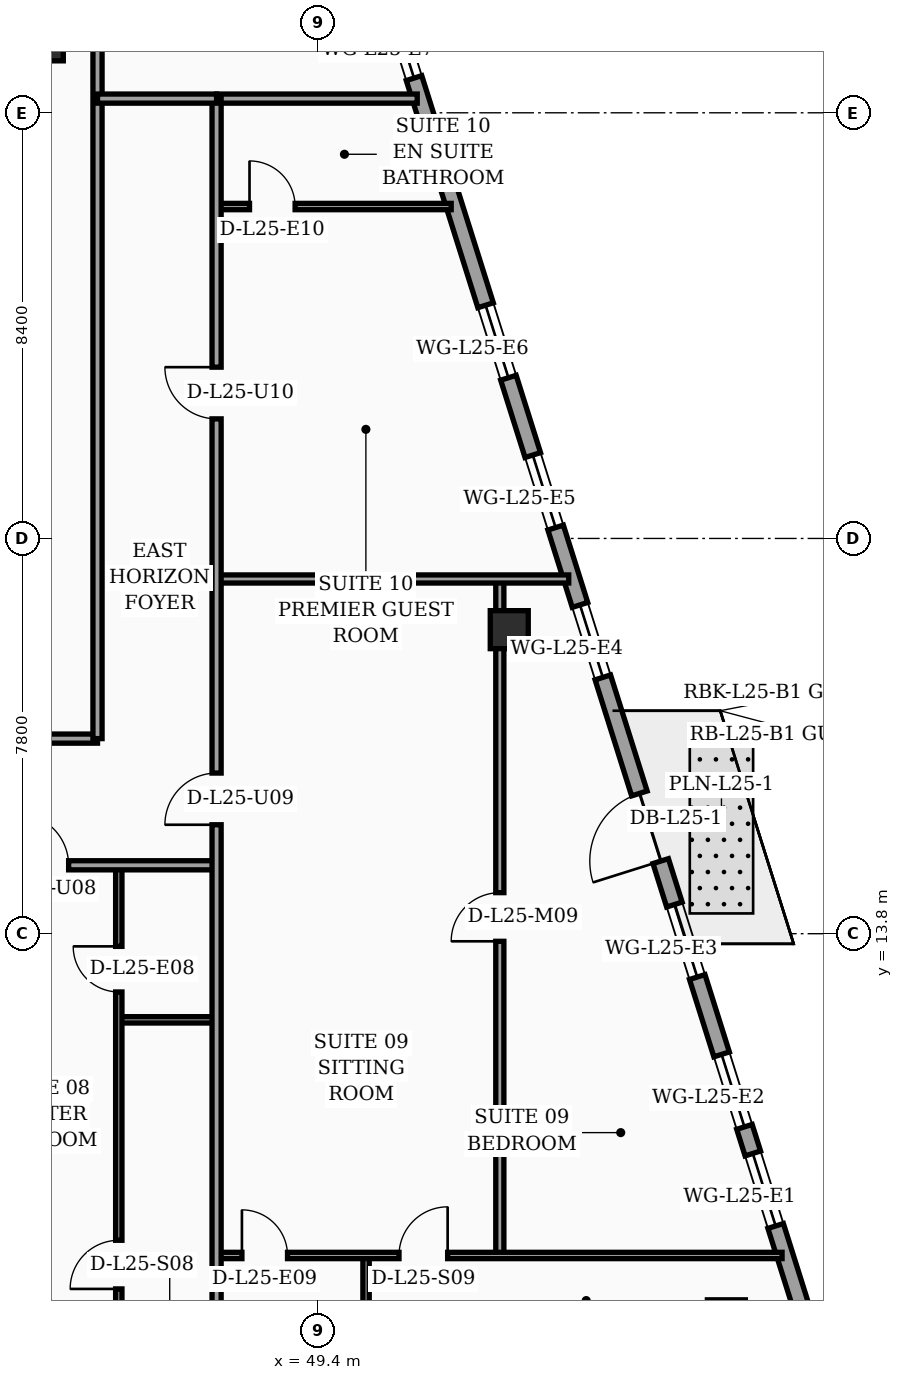
"""IFC4 building model, lengths in metres.
Left out: names, types, materials, properties, quantities, classifications, styles, units other than length and angle.
Written with IfcOpenShell. Run it as: python <this file> out.ifc"""

import sys

from ifc_helpers import new_model, si_unit, direction, frame, frame_2d, origin, origin_2d, place, context, subcontext, project, spatial, rectangle, hollow_rectangle, extrude, element, fill, save


model = new_model("IFC4")
c1 = context("Model", 3, precision=1e-05, world=origin(), true_north=direction((0.0, 1.0)))
c2 = subcontext(c1, "Body", "Model", "MODEL_VIEW")
j1 = project(units=[si_unit("LENGTHUNIT", "METRE"), si_unit("PLANEANGLEUNIT", "RADIAN")], contexts=[c1])
p1 = place(None, origin())
s1 = spatial("IfcSite", under=j1, at=p1, CompositionType="ELEMENT")
p2 = place(p1, origin())
s2 = spatial("IfcBuilding", under=s1, at=p2, CompositionType="ELEMENT")
p3 = place(p2, frame((0.0, 0.0, 105.0)))
s3 = spatial("IfcBuildingStorey", under=s2, at=p3, CompositionType="ELEMENT", Elevation=105.0)
for number, where, z_axis, x_axis in (
    (1, (44.0, 31.4, 0.0), (0.0, 0.0, 1.0), (1.0, 0.0, 0.0)),
    (2, (57.461, 6.2, 0.0), (0.0, 0.0, 1.0), (1.0, 0.0, 0.0)),
    (3, (53.176, 19.8, 0.0), (0.0, 0.0, 1.0), (1.0, 0.0, 0.0)),
):
    element("IfcColumn", number, at=place(p3, frame(where, z_axis=z_axis, x_axis=x_axis)), inside=s3, PredefinedType="COLUMN", context=c2, shape_type="SweptSolid", body=[
        extrude(hollow_rectangle(XDim=0.75, YDim=0.75, WallThickness=0.032, at=origin_2d()), origin(), (0.0, 0.0, 1.0), 3.56),
    ])
p4 = place(p3, frame((59.23, 5.505, 0.0), z_axis=(0.0, 0.0, 1.0), x_axis=(-0.300509063924, 0.953778958931, 0.0)))
e4 = element("IfcWall", 4, at=p4, inside=s3, PredefinedType="SOLIDWALL", context=c2, shape_type="SweptSolid", body=[
    extrude(rectangle(XDim=30.814, YDim=0.32, at=frame_2d((15.407, 0.0))), origin(), (0.0, 0.0, 1.0), 3.56),
])
p5 = place(p4, frame((10.199, 0.0, 0.0)))
e5 = element("IfcOpeningElement", 5, at=p5, cuts=e4, PredefinedType="OPENING", context=c2, shape_type="SweptSolid", body=[
    extrude(rectangle(XDim=1.4, YDim=2.25, at=frame_2d((0.7, 1.125))), frame((0.0, 0.17, 0.0), z_axis=(0.0, -1.0, 0.0), x_axis=(1.0, 0.0, 0.0)), (0.0, 0.0, 1.0), 0.34),
])
p6 = place(p4, frame((2.65, 0.0, 0.75)))
e6 = element("IfcOpeningElement", 6, at=p6, cuts=e4, PredefinedType="OPENING", context=c2, shape_type="SweptSolid", body=[
    extrude(rectangle(XDim=1.5, YDim=1.6, at=frame_2d((0.75, 0.8))), frame((0.0, 0.17, 0.0), z_axis=(0.0, -1.0, 0.0), x_axis=(1.0, 0.0, 0.0)), (0.0, 0.0, 1.0), 0.34),
])
p7 = place(p4, frame((4.7, 0.0, 0.75)))
e7 = element("IfcOpeningElement", 7, at=p7, cuts=e4, PredefinedType="OPENING", context=c2, shape_type="SweptSolid", body=[
    extrude(rectangle(XDim=1.5, YDim=1.6, at=frame_2d((0.75, 0.8))), frame((0.0, 0.17, 0.0), z_axis=(0.0, -1.0, 0.0), x_axis=(1.0, 0.0, 0.0)), (0.0, 0.0, 1.0), 0.34),
])
p8 = place(p4, frame((7.8, 0.0, 0.75)))
e8 = element("IfcOpeningElement", 8, at=p8, cuts=e4, PredefinedType="OPENING", context=c2, shape_type="SweptSolid", body=[
    extrude(rectangle(XDim=1.5, YDim=1.6, at=frame_2d((0.75, 0.8))), frame((0.0, 0.17, 0.0), z_axis=(0.0, -1.0, 0.0), x_axis=(1.0, 0.0, 0.0)), (0.0, 0.0, 1.0), 0.34),
])
p9 = place(p4, frame((14.0, 0.0, 0.75)))
e9 = element("IfcOpeningElement", 9, at=p9, cuts=e4, PredefinedType="OPENING", context=c2, shape_type="SweptSolid", body=[
    extrude(rectangle(XDim=1.5, YDim=1.6, at=frame_2d((0.75, 0.8))), frame((0.0, 0.17, 0.0), z_axis=(0.0, -1.0, 0.0), x_axis=(1.0, 0.0, 0.0)), (0.0, 0.0, 1.0), 0.34),
])
p10 = place(p4, frame((17.1, 0.0, 0.75)))
e10 = element("IfcOpeningElement", 10, at=p10, cuts=e4, PredefinedType="OPENING", context=c2, shape_type="SweptSolid", body=[
    extrude(rectangle(XDim=1.5, YDim=1.6, at=frame_2d((0.75, 0.8))), frame((0.0, 0.17, 0.0), z_axis=(0.0, -1.0, 0.0), x_axis=(1.0, 0.0, 0.0)), (0.0, 0.0, 1.0), 0.34),
])
p11 = place(p4, frame((20.2, 0.0, 0.75)))
e11 = element("IfcOpeningElement", 11, at=p11, cuts=e4, PredefinedType="OPENING", context=c2, shape_type="SweptSolid", body=[
    extrude(rectangle(XDim=1.5, YDim=1.6, at=frame_2d((0.75, 0.8))), frame((0.0, 0.17, 0.0), z_axis=(0.0, -1.0, 0.0), x_axis=(1.0, 0.0, 0.0)), (0.0, 0.0, 1.0), 0.34),
])
p12 = place(p4, frame((26.4, 0.0, 0.75)))
e12 = element("IfcOpeningElement", 12, at=p12, cuts=e4, PredefinedType="OPENING", context=c2, shape_type="SweptSolid", body=[
    extrude(rectangle(XDim=1.5, YDim=1.6, at=frame_2d((0.75, 0.8))), frame((0.0, 0.17, 0.0), z_axis=(0.0, -1.0, 0.0), x_axis=(1.0, 0.0, 0.0)), (0.0, 0.0, 1.0), 0.34),
])
p13 = place(p3, frame((45.47, 12.1, 0.0), z_axis=(0.0, 0.0, 1.0), x_axis=(1.0, 0.0, 0.0)))
e13 = element("IfcWall", 13, at=p13, inside=s3, PredefinedType="PARTITIONING", context=c2, shape_type="SweptSolid", body=[
    extrude(rectangle(XDim=1.93, YDim=0.125, at=frame_2d((0.965, 0.0))), origin(), (0.0, 0.0, 1.0), 2.84),
])
p14 = place(p3, frame((45.47, 2.44, 0.0), z_axis=(0.0, 0.0, 1.0), x_axis=(0.0, 1.0, 0.0)))
e14 = element("IfcWall", 14, at=p14, inside=s3, PredefinedType="PARTITIONING", context=c2, shape_type="SweptSolid", body=[
    extrude(rectangle(XDim=12.71, YDim=0.125, at=frame_2d((6.355, 0.0))), origin(), (0.0, 0.0, 1.0), 3.04),
])
p15 = place(p14, frame((4.35, 0.0, 0.0)))
e15 = element("IfcOpeningElement", 15, at=p15, cuts=e14, PredefinedType="OPENING", context=c2, shape_type="SweptSolid", body=[
    extrude(rectangle(XDim=0.96, YDim=2.2, at=frame_2d((0.48, 1.1))), frame((0.0, 0.073, 0.0), z_axis=(0.0, -1.0, 0.0), x_axis=(1.0, 0.0, 0.0)), (0.0, 0.0, 1.0), 0.145),
])
p16 = place(p14, frame((10.21, 0.0, 0.0)))
e16 = element("IfcOpeningElement", 16, at=p16, cuts=e14, PredefinedType="OPENING", context=c2, shape_type="SweptSolid", body=[
    extrude(rectangle(XDim=0.9, YDim=2.15, at=frame_2d((0.45, 1.075))), frame((0.0, 0.073, 0.0), z_axis=(0.0, -1.0, 0.0), x_axis=(1.0, 0.0, 0.0)), (0.0, 0.0, 1.0), 0.145),
])
p17 = place(p3, frame((32.4, 15.15, 0.0), z_axis=(0.0, 0.0, 1.0), x_axis=(1.0, 0.0, 0.0)))
e17 = element("IfcWall", 17, at=p17, inside=s3, PredefinedType="PARTITIONING", context=c2, shape_type="SweptSolid", body=[
    extrude(rectangle(XDim=15.0, YDim=0.18, at=frame_2d((7.5, 0.0))), origin(), (0.0, 0.0, 1.0), 2.84),
])
p18 = place(p17, frame((0.91, 0.0, 0.0)))
e18 = element("IfcOpeningElement", 18, at=p18, cuts=e17, PredefinedType="OPENING", context=c2, shape_type="SweptSolid", body=[
    extrude(rectangle(XDim=1.02, YDim=2.2, at=frame_2d((0.51, 1.1))), frame((0.0, 0.1, 0.0), z_axis=(0.0, -1.0, 0.0), x_axis=(1.0, 0.0, 0.0)), (0.0, 0.0, 1.0), 0.2),
])
p19 = place(p17, frame((5.85, 0.0, 0.0)))
e19 = element("IfcOpeningElement", 19, at=p19, cuts=e17, PredefinedType="OPENING", context=c2, shape_type="SweptSolid", body=[
    extrude(rectangle(XDim=1.02, YDim=2.2, at=frame_2d((0.51, 1.1))), frame((0.0, 0.1, 0.0), z_axis=(0.0, -1.0, 0.0), x_axis=(1.0, 0.0, 0.0)), (0.0, 0.0, 1.0), 0.2),
])
p20 = place(p17, frame((11.06, 0.0, 0.0)))
e20 = element("IfcOpeningElement", 20, at=p20, cuts=e17, PredefinedType="OPENING", context=c2, shape_type="SweptSolid", body=[
    extrude(rectangle(XDim=1.02, YDim=2.2, at=frame_2d((0.51, 1.1))), frame((0.0, 0.1, 0.0), z_axis=(0.0, -1.0, 0.0), x_axis=(1.0, 0.0, 0.0)), (0.0, 0.0, 1.0), 0.2),
])
p21 = place(p3, frame((21.5, 17.65, 0.0), z_axis=(0.0, 0.0, 1.0), x_axis=(1.0, 0.0, 0.0)))
e21 = element("IfcWall", 21, at=p21, inside=s3, PredefinedType="PARTITIONING", context=c2, shape_type="SweptSolid", body=[
    extrude(rectangle(XDim=23.55, YDim=0.18, at=frame_2d((11.775, 0.0))), origin(), (0.0, 0.0, 1.0), 2.84),
])
p22 = place(p21, frame((0.95, 0.0, 0.0)))
e22 = element("IfcOpeningElement", 22, at=p22, cuts=e21, PredefinedType="OPENING", context=c2, shape_type="SweptSolid", body=[
    extrude(rectangle(XDim=1.02, YDim=2.2, at=frame_2d((0.51, 1.1))), frame((0.0, 0.1, 0.0), z_axis=(0.0, -1.0, 0.0), x_axis=(1.0, 0.0, 0.0)), (0.0, 0.0, 1.0), 0.2),
])
p23 = place(p21, frame((12.68, 0.0, 0.0)))
e23 = element("IfcOpeningElement", 23, at=p23, cuts=e21, PredefinedType="OPENING", context=c2, shape_type="SweptSolid", body=[
    extrude(rectangle(XDim=1.02, YDim=2.2, at=frame_2d((0.51, 1.1))), frame((0.0, 0.1, 0.0), z_axis=(0.0, -1.0, 0.0), x_axis=(1.0, 0.0, 0.0)), (0.0, 0.0, 1.0), 0.2),
])
p24 = place(p3, frame((45.05, 17.65, 0.0), z_axis=(0.0, 0.0, 1.0), x_axis=(0.0, 1.0, 0.0)))
e24 = element("IfcWall", 24, at=p24, inside=s3, PredefinedType="PARTITIONING", context=c2, shape_type="SweptSolid", body=[
    extrude(rectangle(XDim=19.9, YDim=0.18, at=frame_2d((9.95, 0.0))), origin(), (0.0, 0.0, 1.0), 2.84),
])
p25 = place(p3, frame((50.35, 5.66, 0.0), z_axis=(0.0, 0.0, 1.0), x_axis=(0.0, 1.0, 0.0)))
e25 = element("IfcWall", 25, at=p25, inside=s3, PredefinedType="PARTITIONING", context=c2, shape_type="SweptSolid", body=[
    extrude(rectangle(XDim=1.79, YDim=0.125, at=frame_2d((0.895, 0.0))), origin(), (0.0, 0.0, 1.0), 3.56),
])
p26 = place(p3, frame((52.99, 7.45, 0.0), z_axis=(0.0, 0.0, 1.0), x_axis=(0.0, 1.0, 0.0)))
e26 = element("IfcWall", 26, at=p26, inside=s3, PredefinedType="PARTITIONING", context=c2, shape_type="SweptSolid", body=[
    extrude(rectangle(XDim=13.35, YDim=0.16, at=frame_2d((6.675, 0.0))), origin(), (0.0, 0.0, 1.0), 2.84),
])
p27 = place(p26, frame((6.2, 0.0, 0.0)))
e27 = element("IfcOpeningElement", 27, at=p27, cuts=e26, PredefinedType="OPENING", context=c2, shape_type="SweptSolid", body=[
    extrude(rectangle(XDim=0.96, YDim=2.2, at=frame_2d((0.48, 1.1))), frame((0.0, 0.09, 0.0), z_axis=(0.0, -1.0, 0.0), x_axis=(1.0, 0.0, 0.0)), (0.0, 0.0, 1.0), 0.18),
])
p28 = place(p3, frame((47.4, 7.45, 0.0), z_axis=(0.0, 0.0, 1.0), x_axis=(1.0, 0.0, 0.0)))
e28 = element("IfcWall", 28, at=p28, inside=s3, PredefinedType="PARTITIONING", context=c2, shape_type="SweptSolid", body=[
    extrude(rectangle(XDim=11.16, YDim=0.125, at=frame_2d((5.58, 0.0))), origin(), (0.0, 0.0, 1.0), 2.84),
])
p29 = place(p28, frame((0.5, 0.0, 0.0)))
e29 = element("IfcOpeningElement", 29, at=p29, cuts=e28, PredefinedType="OPENING", context=c2, shape_type="SweptSolid", body=[
    extrude(rectangle(XDim=0.9, YDim=2.15, at=frame_2d((0.45, 1.075))), frame((0.0, 0.073, 0.0), z_axis=(0.0, -1.0, 0.0), x_axis=(1.0, 0.0, 0.0)), (0.0, 0.0, 1.0), 0.145),
])
p30 = place(p28, frame((3.6, 0.0, 0.0)))
e30 = element("IfcOpeningElement", 30, at=p30, cuts=e28, PredefinedType="OPENING", context=c2, shape_type="SweptSolid", body=[
    extrude(rectangle(XDim=0.96, YDim=2.2, at=frame_2d((0.48, 1.1))), frame((0.0, 0.073, 0.0), z_axis=(0.0, -1.0, 0.0), x_axis=(1.0, 0.0, 0.0)), (0.0, 0.0, 1.0), 0.145),
])
p31 = place(p3, frame((47.4, 28.15, 0.0), z_axis=(0.0, 0.0, 1.0), x_axis=(1.0, 0.0, 0.0)))
e31 = element("IfcWall", 31, at=p31, inside=s3, PredefinedType="PARTITIONING", context=c2, shape_type="SweptSolid", body=[
    extrude(rectangle(XDim=4.63, YDim=0.125, at=frame_2d((2.315, 0.0))), origin(), (0.0, 0.0, 1.0), 3.04),
])
p32 = place(p31, frame((0.65, 0.0, 0.0)))
e32 = element("IfcOpeningElement", 32, at=p32, cuts=e31, PredefinedType="OPENING", context=c2, shape_type="SweptSolid", body=[
    extrude(rectangle(XDim=0.9, YDim=2.15, at=frame_2d((0.45, 1.075))), frame((0.0, 0.073, 0.0), z_axis=(0.0, -1.0, 0.0), x_axis=(1.0, 0.0, 0.0)), (0.0, 0.0, 1.0), 0.145),
])
p33 = place(p3, frame((47.4, 20.8, 0.0), z_axis=(0.0, 0.0, 1.0), x_axis=(1.0, 0.0, 0.0)))
e33 = element("IfcWall", 33, at=p33, inside=s3, PredefinedType="PARTITIONING", context=c2, shape_type="SweptSolid", body=[
    extrude(rectangle(XDim=6.95, YDim=0.16, at=frame_2d((3.475, 0.0))), origin(), (0.0, 0.0, 1.0), 3.04),
])
p34 = place(p3, frame((47.4, 30.28, 0.0), z_axis=(0.0, 0.0, 1.0), x_axis=(1.0, 0.0, 0.0)))
e34 = element("IfcWall", 34, at=p34, inside=s3, PredefinedType="PARTITIONING", context=c2, shape_type="SweptSolid", body=[
    extrude(rectangle(XDim=3.96, YDim=0.18, at=frame_2d((1.98, 0.0))), origin(), (0.0, 0.0, 1.0), 3.04),
])
p35 = place(p3, frame((47.4, 2.44, 0.0), z_axis=(0.0, 0.0, 1.0), x_axis=(0.0, 1.0, 0.0)))
e35 = element("IfcWall", 35, at=p35, inside=s3, PredefinedType="PARTITIONING", context=c2, shape_type="SweptSolid", body=[
    extrude(rectangle(XDim=27.84, YDim=0.18, at=frame_2d((13.92, 0.0))), origin(), (0.0, 0.0, 1.0), 2.84),
])
p36 = place(p35, frame((13.51, 0.0, 0.0)))
e36 = element("IfcOpeningElement", 36, at=p36, cuts=e35, PredefinedType="OPENING", context=c2, shape_type="SweptSolid", body=[
    extrude(rectangle(XDim=1.02, YDim=2.2, at=frame_2d((0.51, 1.1))), frame((0.0, 0.1, 0.0), z_axis=(0.0, -1.0, 0.0), x_axis=(1.0, 0.0, 0.0)), (0.0, 0.0, 1.0), 0.2),
])
p37 = place(p35, frame((21.52, 0.0, 0.0)))
e37 = element("IfcOpeningElement", 37, at=p37, cuts=e35, PredefinedType="OPENING", context=c2, shape_type="SweptSolid", body=[
    extrude(rectangle(XDim=1.02, YDim=2.2, at=frame_2d((0.51, 1.1))), frame((0.0, 0.1, 0.0), z_axis=(0.0, -1.0, 0.0), x_axis=(1.0, 0.0, 0.0)), (0.0, 0.0, 1.0), 0.2),
])
p38 = place(p3, frame((45.05, 30.28, 0.0), z_axis=(0.0, 0.0, 1.0), x_axis=(1.0, 0.0, 0.0)))
e38 = element("IfcWall", 38, at=p38, inside=s3, PredefinedType="PARTITIONING", context=c2, shape_type="SweptSolid", body=[
    extrude(rectangle(XDim=2.35, YDim=0.18, at=frame_2d((1.175, 0.0))), origin(), (0.0, 0.0, 1.0), 2.84),
])
p39 = place(p5, origin())
e39 = element("IfcDoor", 39, at=p39, inside=s3, OperationType="SINGLE_SWING_LEFT", PredefinedType="DOOR", context=c2, shape_type="SweptSolid", body=[
    extrude(rectangle(XDim=1.4, YDim=2.25, at=frame_2d((0.7, 1.125))), frame((0.0, 0.025, 0.0), z_axis=(0.0, -1.0, 0.0), x_axis=(1.0, 0.0, 0.0)), (0.0, 0.0, 1.0), 0.05),
])
fill(e5, e39)
p40 = place(p6, origin())
e40 = element("IfcWindow", 40, at=p40, inside=s3, PartitioningType="SINGLE_PANEL", PredefinedType="WINDOW", context=c2, shape_type="SweptSolid", body=[
    extrude(rectangle(XDim=1.5, YDim=1.6, at=frame_2d((0.75, 0.8))), frame((0.0, 0.03, 0.0), z_axis=(0.0, -1.0, 0.0), x_axis=(1.0, 0.0, 0.0)), (0.0, 0.0, 1.0), 0.06),
])
fill(e6, e40)
p41 = place(p7, origin())
e41 = element("IfcWindow", 41, at=p41, inside=s3, PartitioningType="SINGLE_PANEL", PredefinedType="WINDOW", context=c2, shape_type="SweptSolid", body=[
    extrude(rectangle(XDim=1.5, YDim=1.6, at=frame_2d((0.75, 0.8))), frame((0.0, 0.03, 0.0), z_axis=(0.0, -1.0, 0.0), x_axis=(1.0, 0.0, 0.0)), (0.0, 0.0, 1.0), 0.06),
])
fill(e7, e41)
p42 = place(p8, origin())
e42 = element("IfcWindow", 42, at=p42, inside=s3, PartitioningType="SINGLE_PANEL", PredefinedType="WINDOW", context=c2, shape_type="SweptSolid", body=[
    extrude(rectangle(XDim=1.5, YDim=1.6, at=frame_2d((0.75, 0.8))), frame((0.0, 0.03, 0.0), z_axis=(0.0, -1.0, 0.0), x_axis=(1.0, 0.0, 0.0)), (0.0, 0.0, 1.0), 0.06),
])
fill(e8, e42)
p43 = place(p9, origin())
e43 = element("IfcWindow", 43, at=p43, inside=s3, PartitioningType="SINGLE_PANEL", PredefinedType="WINDOW", context=c2, shape_type="SweptSolid", body=[
    extrude(rectangle(XDim=1.5, YDim=1.6, at=frame_2d((0.75, 0.8))), frame((0.0, 0.03, 0.0), z_axis=(0.0, -1.0, 0.0), x_axis=(1.0, 0.0, 0.0)), (0.0, 0.0, 1.0), 0.06),
])
fill(e9, e43)
p44 = place(p10, origin())
e44 = element("IfcWindow", 44, at=p44, inside=s3, PartitioningType="SINGLE_PANEL", PredefinedType="WINDOW", context=c2, shape_type="SweptSolid", body=[
    extrude(rectangle(XDim=1.5, YDim=1.6, at=frame_2d((0.75, 0.8))), frame((0.0, 0.03, 0.0), z_axis=(0.0, -1.0, 0.0), x_axis=(1.0, 0.0, 0.0)), (0.0, 0.0, 1.0), 0.06),
])
fill(e10, e44)
p45 = place(p11, origin())
e45 = element("IfcWindow", 45, at=p45, inside=s3, PartitioningType="SINGLE_PANEL", PredefinedType="WINDOW", context=c2, shape_type="SweptSolid", body=[
    extrude(rectangle(XDim=1.5, YDim=1.6, at=frame_2d((0.75, 0.8))), frame((0.0, 0.03, 0.0), z_axis=(0.0, -1.0, 0.0), x_axis=(1.0, 0.0, 0.0)), (0.0, 0.0, 1.0), 0.06),
])
fill(e11, e45)
p46 = place(p12, origin())
e46 = element("IfcWindow", 46, at=p46, inside=s3, PartitioningType="SINGLE_PANEL", PredefinedType="WINDOW", context=c2, shape_type="SweptSolid", body=[
    extrude(rectangle(XDim=1.5, YDim=1.6, at=frame_2d((0.75, 0.8))), frame((0.0, 0.03, 0.0), z_axis=(0.0, -1.0, 0.0), x_axis=(1.0, 0.0, 0.0)), (0.0, 0.0, 1.0), 0.06),
])
fill(e12, e46)
p47 = place(p15, origin())
e47 = element("IfcDoor", 47, at=p47, inside=s3, OperationType="SINGLE_SWING_LEFT", PredefinedType="DOOR", context=c2, shape_type="SweptSolid", body=[
    extrude(rectangle(XDim=0.96, YDim=2.2, at=frame_2d((0.48, 1.1))), frame((0.0, 0.025, 0.0), z_axis=(0.0, -1.0, 0.0), x_axis=(1.0, 0.0, 0.0)), (0.0, 0.0, 1.0), 0.05),
])
fill(e15, e47)
p48 = place(p16, origin())
e48 = element("IfcDoor", 48, at=p48, inside=s3, OperationType="SINGLE_SWING_RIGHT", PredefinedType="DOOR", context=c2, shape_type="SweptSolid", body=[
    extrude(rectangle(XDim=0.9, YDim=2.15, at=frame_2d((0.45, 1.075))), frame((0.0, 0.025, 0.0), z_axis=(0.0, -1.0, 0.0), x_axis=(1.0, 0.0, 0.0)), (0.0, 0.0, 1.0), 0.05),
])
fill(e16, e48)
p49 = place(p20, origin())
e49 = element("IfcDoor", 49, at=p49, inside=s3, OperationType="SINGLE_SWING_LEFT", PredefinedType="DOOR", context=c2, shape_type="SweptSolid", body=[
    extrude(rectangle(XDim=1.02, YDim=2.2, at=frame_2d((0.51, 1.1))), frame((0.0, 0.025, 0.0), z_axis=(0.0, -1.0, 0.0), x_axis=(1.0, 0.0, 0.0)), (0.0, 0.0, 1.0), 0.05),
])
fill(e20, e49)
p50 = place(p27, origin())
e50 = element("IfcDoor", 50, at=p50, inside=s3, OperationType="SINGLE_SWING_LEFT", PredefinedType="DOOR", context=c2, shape_type="SweptSolid", body=[
    extrude(rectangle(XDim=0.96, YDim=2.2, at=frame_2d((0.48, 1.1))), frame((0.0, 0.025, 0.0), z_axis=(0.0, -1.0, 0.0), x_axis=(1.0, 0.0, 0.0)), (0.0, 0.0, 1.0), 0.05),
])
fill(e27, e50)
p51 = place(p29, origin())
e51 = element("IfcDoor", 51, at=p51, inside=s3, OperationType="SINGLE_SWING_LEFT", PredefinedType="DOOR", context=c2, shape_type="SweptSolid", body=[
    extrude(rectangle(XDim=0.9, YDim=2.15, at=frame_2d((0.45, 1.075))), frame((0.0, 0.025, 0.0), z_axis=(0.0, -1.0, 0.0), x_axis=(1.0, 0.0, 0.0)), (0.0, 0.0, 1.0), 0.05),
])
fill(e29, e51)
p52 = place(p30, origin())
e52 = element("IfcDoor", 52, at=p52, inside=s3, OperationType="SINGLE_SWING_RIGHT", PredefinedType="DOOR", context=c2, shape_type="SweptSolid", body=[
    extrude(rectangle(XDim=0.96, YDim=2.2, at=frame_2d((0.48, 1.1))), frame((0.0, 0.025, 0.0), z_axis=(0.0, -1.0, 0.0), x_axis=(1.0, 0.0, 0.0)), (0.0, 0.0, 1.0), 0.05),
])
fill(e30, e52)
p53 = place(p32, origin())
e53 = element("IfcDoor", 53, at=p53, inside=s3, OperationType="SINGLE_SWING_LEFT", PredefinedType="DOOR", context=c2, shape_type="SweptSolid", body=[
    extrude(rectangle(XDim=0.9, YDim=2.15, at=frame_2d((0.45, 1.075))), frame((0.0, 0.025, 0.0), z_axis=(0.0, -1.0, 0.0), x_axis=(1.0, 0.0, 0.0)), (0.0, 0.0, 1.0), 0.05),
])
fill(e32, e53)
p54 = place(p36, origin())
e54 = element("IfcDoor", 54, at=p54, inside=s3, OperationType="SINGLE_SWING_LEFT", PredefinedType="DOOR", context=c2, shape_type="SweptSolid", body=[
    extrude(rectangle(XDim=1.02, YDim=2.2, at=frame_2d((0.51, 1.1))), frame((0.0, 0.025, 0.0), z_axis=(0.0, -1.0, 0.0), x_axis=(1.0, 0.0, 0.0)), (0.0, 0.0, 1.0), 0.05),
])
fill(e36, e54)
p55 = place(p37, origin())
e55 = element("IfcDoor", 55, at=p55, inside=s3, OperationType="SINGLE_SWING_RIGHT", PredefinedType="DOOR", context=c2, shape_type="SweptSolid", body=[
    extrude(rectangle(XDim=1.02, YDim=2.2, at=frame_2d((0.51, 1.1))), frame((0.0, 0.025, 0.0), z_axis=(0.0, -1.0, 0.0), x_axis=(1.0, 0.0, 0.0)), (0.0, 0.0, 1.0), 0.05),
])
fill(e37, e55)
save(model, sys.argv[1])
